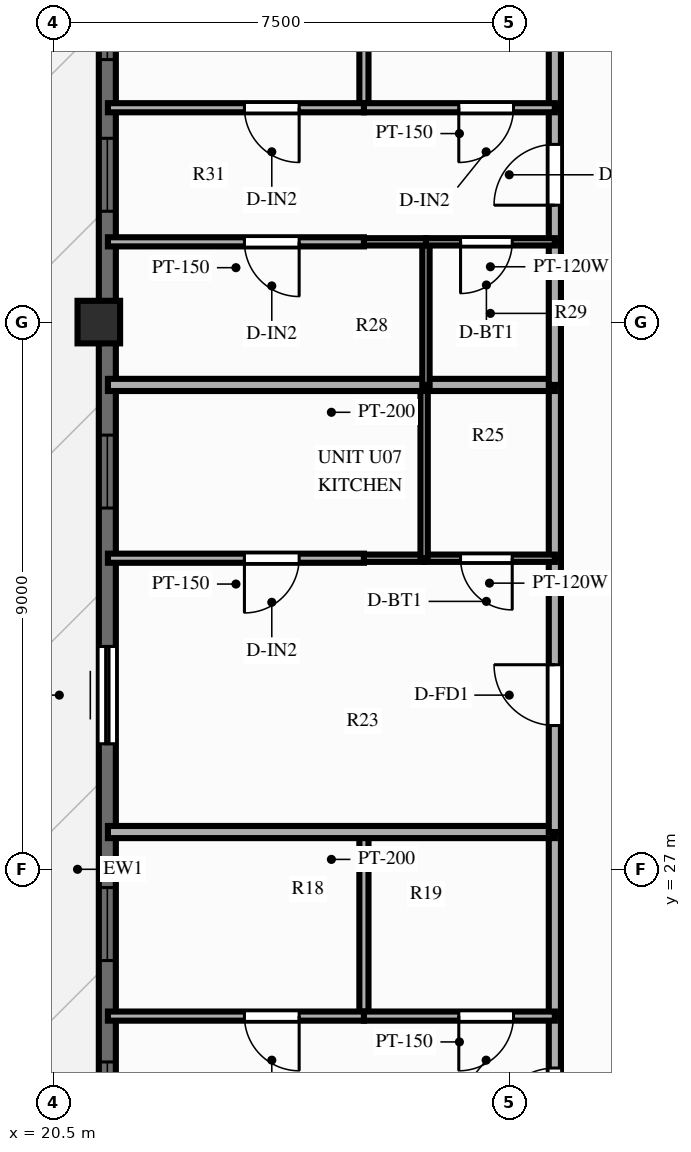
"""IFC4 building model, lengths in metres.
Left out: names, types, materials, properties, quantities, classifications, styles, units other than length and angle.
Written with IfcOpenShell. Run it as: python <this file> out.ifc"""

import sys

from ifc_helpers import new_model, si_unit, direction, frame, frame_2d, origin, origin_2d, place, context, subcontext, project, spatial, rectangle, extrude, source, transform, mapped, element, fill, save


model = new_model("IFC4")
c1 = context("Model", 3, precision=1e-05, world=origin(), true_north=direction((0.0, 1.0)))
c2 = subcontext(c1, "Body", "Model", "MODEL_VIEW")
j1 = project(units=[si_unit("LENGTHUNIT", "METRE"), si_unit("PLANEANGLEUNIT", "RADIAN")], contexts=[c1])
p1 = place(None, origin())
s1 = spatial("IfcSite", under=j1, at=p1, CompositionType="ELEMENT")
p2 = place(p1, origin())
s2 = spatial("IfcBuilding", under=s1, at=p2, CompositionType="ELEMENT")
p3 = place(p2, frame((0.0, 0.0, 236.1)))
s3 = spatial("IfcBuildingStorey", under=s2, at=p3, CompositionType="ELEMENT", Elevation=236.1)
m1 = source(origin(), c2, "Body", "SweptSolid", [
    extrude(rectangle(XDim=0.7, YDim=0.7, at=origin_2d()), origin(), (0.0, 0.0, 1.0), 3.9),
])
p4 = place(p3, frame((21.25, 36.0, 0.0), z_axis=(0.0, 0.0, 1.0), x_axis=(1.0, 0.0, 0.0)))
e1 = element("IfcColumn", 1, at=p4, inside=s3, PredefinedType="COLUMN", context=c2, shape_type="MappedRepresentation", body=[
    mapped(m1, transform((0.0, 0.0, 0.0), scale=1.0)),
])
p5 = place(p3, frame((21.39, 11.5, 0.0), z_axis=(0.0, 0.0, 1.0), x_axis=(0.0, 1.0, 0.0)))
e2 = element("IfcWall", 2, at=p5, inside=s3, PredefinedType="SOLIDWALL", context=c2, shape_type="SweptSolid", body=[
    extrude(rectangle(XDim=31.0, YDim=0.28, at=frame_2d((15.5, 0.0))), origin(), (0.0, 0.0, 1.0), 2.44),
])
p6 = place(p5, frame((0.7, 0.0, 0.25)))
e3 = element("IfcOpeningElement", 3, at=p6, cuts=e2, PredefinedType="OPENING", context=c2, shape_type="SweptSolid", body=[
    extrude(rectangle(XDim=1.2, YDim=1.5, at=frame_2d((0.6, 0.75))), frame((0.0, 0.152, 0.0), z_axis=(0.0, -1.0, 0.0), x_axis=(1.0, 0.0, 0.0)), (0.0, 0.0, 1.0), 0.304),
])
p7 = place(p5, frame((3.195, 0.0, 0.25)))
e4 = element("IfcOpeningElement", 4, at=p7, cuts=e2, PredefinedType="OPENING", context=c2, shape_type="SweptSolid", body=[
    extrude(rectangle(XDim=1.2, YDim=1.5, at=frame_2d((0.6, 0.75))), frame((0.0, 0.152, 0.0), z_axis=(0.0, -1.0, 0.0), x_axis=(1.0, 0.0, 0.0)), (0.0, 0.0, 1.0), 0.304),
])
p8 = place(p5, frame((7.068, 0.0, 0.25)))
e5 = element("IfcOpeningElement", 5, at=p8, cuts=e2, PredefinedType="OPENING", context=c2, shape_type="SweptSolid", body=[
    extrude(rectangle(XDim=0.7, YDim=1.5, at=frame_2d((0.35, 0.75))), frame((0.0, 0.152, 0.0), z_axis=(0.0, -1.0, 0.0), x_axis=(1.0, 0.0, 0.0)), (0.0, 0.0, 1.0), 0.304),
])
p9 = place(p5, frame((8.662, 0.0, 0.25)))
e6 = element("IfcOpeningElement", 6, at=p9, cuts=e2, PredefinedType="OPENING", context=c2, shape_type="SweptSolid", body=[
    extrude(rectangle(XDim=1.2, YDim=1.5, at=frame_2d((0.6, 0.75))), frame((0.0, 0.152, 0.0), z_axis=(0.0, -1.0, 0.0), x_axis=(1.0, 0.0, 0.0)), (0.0, 0.0, 1.0), 0.304),
])
p10 = place(p5, frame((11.131, 0.0, 0.25)))
e7 = element("IfcOpeningElement", 7, at=p10, cuts=e2, PredefinedType="OPENING", context=c2, shape_type="SweptSolid", body=[
    extrude(rectangle(XDim=1.2, YDim=1.5, at=frame_2d((0.6, 0.75))), frame((0.0, 0.152, 0.0), z_axis=(0.0, -1.0, 0.0), x_axis=(1.0, 0.0, 0.0)), (0.0, 0.0, 1.0), 0.304),
])
p11 = place(p5, frame((13.999, 0.0, 0.25)))
e8 = element("IfcOpeningElement", 8, at=p11, cuts=e2, PredefinedType="OPENING", context=c2, shape_type="SweptSolid", body=[
    extrude(rectangle(XDim=1.2, YDim=1.5, at=frame_2d((0.6, 0.75))), frame((0.0, 0.152, 0.0), z_axis=(0.0, -1.0, 0.0), x_axis=(1.0, 0.0, 0.0)), (0.0, 0.0, 1.0), 0.304),
])
p12 = place(p5, frame((17.565, 0.0, 0.0)))
e9 = element("IfcOpeningElement", 9, at=p12, cuts=e2, PredefinedType="OPENING", context=c2, shape_type="SweptSolid", body=[
    extrude(rectangle(XDim=1.6, YDim=2.15, at=frame_2d((0.8, 1.075))), frame((0.0, 0.152, 0.0), z_axis=(0.0, -1.0, 0.0), x_axis=(1.0, 0.0, 0.0)), (0.0, 0.0, 1.0), 0.304),
])
p13 = place(p5, frame((21.441, 0.0, 0.25)))
e10 = element("IfcOpeningElement", 10, at=p13, cuts=e2, PredefinedType="OPENING", context=c2, shape_type="SweptSolid", body=[
    extrude(rectangle(XDim=1.2, YDim=1.5, at=frame_2d((0.6, 0.75))), frame((0.0, 0.152, 0.0), z_axis=(0.0, -1.0, 0.0), x_axis=(1.0, 0.0, 0.0)), (0.0, 0.0, 1.0), 0.304),
])
p14 = place(p5, frame((26.323, 0.0, 0.25)))
e11 = element("IfcOpeningElement", 11, at=p14, cuts=e2, PredefinedType="OPENING", context=c2, shape_type="SweptSolid", body=[
    extrude(rectangle(XDim=1.2, YDim=1.5, at=frame_2d((0.6, 0.75))), frame((0.0, 0.152, 0.0), z_axis=(0.0, -1.0, 0.0), x_axis=(1.0, 0.0, 0.0)), (0.0, 0.0, 1.0), 0.304),
])
p15 = place(p5, frame((28.818, 0.0, 0.25)))
e12 = element("IfcOpeningElement", 12, at=p15, cuts=e2, PredefinedType="OPENING", context=c2, shape_type="SweptSolid", body=[
    extrude(rectangle(XDim=1.2, YDim=1.5, at=frame_2d((0.6, 0.75))), frame((0.0, 0.152, 0.0), z_axis=(0.0, -1.0, 0.0), x_axis=(1.0, 0.0, 0.0)), (0.0, 0.0, 1.0), 0.304),
])
p16 = place(p3, frame((28.75, 21.877, 0.0), z_axis=(0.0, 0.0, 1.0), x_axis=(0.0, 1.0, 0.0)))
e13 = element("IfcWall", 13, at=p16, inside=s3, PredefinedType="PARTITIONING", context=c2, shape_type="SweptSolid", body=[
    extrude(rectangle(XDim=2.709, YDim=0.2, at=frame_2d((1.354, 0.0))), origin(), (0.0, 0.0, 1.0), 3.56),
])
p17 = place(p16, frame((0.854, 0.0, 0.0)))
e14 = element("IfcOpeningElement", 14, at=p17, cuts=e13, PredefinedType="OPENING", context=c2, shape_type="SweptSolid", body=[
    extrude(rectangle(XDim=1.0, YDim=2.15, at=frame_2d((0.5, 1.075))), frame((0.0, 0.112, 0.0), z_axis=(0.0, -1.0, 0.0), x_axis=(1.0, 0.0, 0.0)), (0.0, 0.0, 1.0), 0.224),
])
p18 = place(p3, frame((28.75, 24.586, 0.0), z_axis=(0.0, 0.0, 1.0), x_axis=(0.0, 1.0, 0.0)))
e15 = element("IfcWall", 15, at=p18, inside=s3, PredefinedType="PARTITIONING", context=c2, shape_type="SweptSolid", body=[
    extrude(rectangle(XDim=3.027, YDim=0.2, at=frame_2d((1.514, 0.0))), origin(), (0.0, 0.0, 1.0), 3.56),
])
p19 = place(p3, frame((25.61, 24.586, 0.0), z_axis=(0.0, 0.0, 1.0), x_axis=(0.0, 1.0, 0.0)))
e16 = element("IfcWall", 16, at=p19, inside=s3, PredefinedType="PARTITIONING", context=c2, shape_type="SweptSolid", body=[
    extrude(rectangle(XDim=3.027, YDim=0.15, at=frame_2d((1.514, 0.0))), origin(), (0.0, 0.0, 1.0), 3.39),
])
p20 = place(p3, frame((28.75, 24.586, 0.0), z_axis=(0.0, 0.0, 1.0), x_axis=(-1.0, 0.0, 0.0)))
e17 = element("IfcWall", 17, at=p20, inside=s3, PredefinedType="PARTITIONING", context=c2, shape_type="SweptSolid", body=[
    extrude(rectangle(XDim=3.14, YDim=0.15, at=frame_2d((1.57, 0.0))), origin(), (0.0, 0.0, 1.0), 3.56),
])
p21 = place(p20, frame((0.68, 0.0, 0.0)))
e18 = element("IfcOpeningElement", 18, at=p21, cuts=e17, PredefinedType="OPENING", context=c2, shape_type="SweptSolid", body=[
    extrude(rectangle(XDim=0.9, YDim=2.1, at=frame_2d((0.45, 1.05))), frame((0.0, 0.087, 0.0), z_axis=(0.0, -1.0, 0.0), x_axis=(1.0, 0.0, 0.0)), (0.0, 0.0, 1.0), 0.174),
])
p22 = place(p3, frame((25.61, 24.586, 0.0), z_axis=(0.0, 0.0, 1.0), x_axis=(-1.0, 0.0, 0.0)))
e19 = element("IfcWall", 19, at=p22, inside=s3, PredefinedType="PARTITIONING", context=c2, shape_type="SweptSolid", body=[
    extrude(rectangle(XDim=4.21, YDim=0.15, at=frame_2d((2.105, 0.0))), origin(), (0.0, 0.0, 1.0), 3.56),
])
p23 = place(p22, frame((1.065, 0.0, 0.0)))
e20 = element("IfcOpeningElement", 20, at=p23, cuts=e19, PredefinedType="OPENING", context=c2, shape_type="SweptSolid", body=[
    extrude(rectangle(XDim=0.9, YDim=2.1, at=frame_2d((0.45, 1.05))), frame((0.0, 0.087, 0.0), z_axis=(0.0, -1.0, 0.0), x_axis=(1.0, 0.0, 0.0)), (0.0, 0.0, 1.0), 0.174),
])
p24 = place(p3, frame((28.75, 27.613, 0.0), z_axis=(0.0, 0.0, 1.0), x_axis=(-1.0, 0.0, 0.0)))
e21 = element("IfcWall", 21, at=p24, inside=s3, PredefinedType="PARTITIONING", context=c2, shape_type="SweptSolid", body=[
    extrude(rectangle(XDim=7.35, YDim=0.2, at=frame_2d((3.675, 0.0))), origin(), (0.0, 0.0, 1.0), 3.56),
])
p25 = place(p3, frame((28.75, 27.613, 0.0), z_axis=(0.0, 0.0, 1.0), x_axis=(0.0, 1.0, 0.0)))
e22 = element("IfcWall", 22, at=p25, inside=s3, PredefinedType="PARTITIONING", context=c2, shape_type="SweptSolid", body=[
    extrude(rectangle(XDim=4.504, YDim=0.2, at=frame_2d((2.252, 0.0))), origin(), (0.0, 0.0, 1.0), 3.56),
])
p26 = place(p25, frame((1.752, 0.0, 0.0)))
e23 = element("IfcOpeningElement", 23, at=p26, cuts=e22, PredefinedType="OPENING", context=c2, shape_type="SweptSolid", body=[
    extrude(rectangle(XDim=1.0, YDim=2.15, at=frame_2d((0.5, 1.075))), frame((0.0, 0.112, 0.0), z_axis=(0.0, -1.0, 0.0), x_axis=(1.0, 0.0, 0.0)), (0.0, 0.0, 1.0), 0.224),
])
p27 = place(p3, frame((28.75, 32.116, 0.0), z_axis=(0.0, 0.0, 1.0), x_axis=(0.0, 1.0, 0.0)))
e24 = element("IfcWall", 24, at=p27, inside=s3, PredefinedType="PARTITIONING", context=c2, shape_type="SweptSolid", body=[
    extrude(rectangle(XDim=2.85, YDim=0.2, at=frame_2d((1.425, 0.0))), origin(), (0.0, 0.0, 1.0), 3.56),
])
p28 = place(p3, frame((28.75, 32.116, 0.0), z_axis=(0.0, 0.0, 1.0), x_axis=(-1.0, 0.0, 0.0)))
e25 = element("IfcWall", 25, at=p28, inside=s3, PredefinedType="PARTITIONING", context=c2, shape_type="SweptSolid", body=[
    extrude(rectangle(XDim=2.15, YDim=0.12, at=frame_2d((1.075, 0.0))), origin(), (0.0, 0.0, 1.0), 3.29),
])
p29 = place(p28, frame((0.701, 0.0, 0.0)))
e26 = element("IfcOpeningElement", 26, at=p29, cuts=e25, PredefinedType="OPENING", context=c2, shape_type="SweptSolid", body=[
    extrude(rectangle(XDim=0.85, YDim=2.05, at=frame_2d((0.425, 1.025))), frame((0.0, 0.072, 0.0), z_axis=(0.0, -1.0, 0.0), x_axis=(1.0, 0.0, 0.0)), (0.0, 0.0, 1.0), 0.144),
])
p30 = place(p3, frame((26.6, 32.116, 0.0), z_axis=(0.0, 0.0, 1.0), x_axis=(-1.0, 0.0, 0.0)))
e27 = element("IfcWall", 27, at=p30, inside=s3, PredefinedType="PARTITIONING", context=c2, shape_type="SweptSolid", body=[
    extrude(rectangle(XDim=0.99, YDim=0.12, at=frame_2d((0.495, 0.0))), origin(), (0.0, 0.0, 1.0), 3.29),
])
p31 = place(p3, frame((26.6, 32.116, 0.0), z_axis=(0.0, 0.0, 1.0), x_axis=(0.0, 1.0, 0.0)))
e28 = element("IfcWall", 28, at=p31, inside=s3, PredefinedType="PARTITIONING", context=c2, shape_type="SweptSolid", body=[
    extrude(rectangle(XDim=2.85, YDim=0.12, at=frame_2d((1.425, 0.0))), origin(), (0.0, 0.0, 1.0), 3.39),
])
p32 = place(p3, frame((25.61, 32.116, 0.0), z_axis=(0.0, 0.0, 1.0), x_axis=(-1.0, 0.0, 0.0)))
e29 = element("IfcWall", 29, at=p32, inside=s3, PredefinedType="PARTITIONING", context=c2, shape_type="SweptSolid", body=[
    extrude(rectangle(XDim=4.21, YDim=0.15, at=frame_2d((2.105, 0.0))), origin(), (0.0, 0.0, 1.0), 3.29),
])
p33 = place(p32, frame((1.065, 0.0, 0.0)))
e30 = element("IfcOpeningElement", 30, at=p33, cuts=e29, PredefinedType="OPENING", context=c2, shape_type="SweptSolid", body=[
    extrude(rectangle(XDim=0.9, YDim=2.1, at=frame_2d((0.45, 1.05))), frame((0.0, 0.087, 0.0), z_axis=(0.0, -1.0, 0.0), x_axis=(1.0, 0.0, 0.0)), (0.0, 0.0, 1.0), 0.174),
])
p34 = place(p3, frame((28.75, 34.966, 0.0), z_axis=(0.0, 0.0, 1.0), x_axis=(-1.0, 0.0, 0.0)))
e31 = element("IfcWall", 31, at=p34, inside=s3, PredefinedType="PARTITIONING", context=c2, shape_type="SweptSolid", body=[
    extrude(rectangle(XDim=7.35, YDim=0.2, at=frame_2d((3.675, 0.0))), origin(), (0.0, 0.0, 1.0), 3.56),
])
p35 = place(p3, frame((28.75, 34.966, 0.0), z_axis=(0.0, 0.0, 1.0), x_axis=(0.0, 1.0, 0.0)))
e32 = element("IfcWall", 32, at=p35, inside=s3, PredefinedType="PARTITIONING", context=c2, shape_type="SweptSolid", body=[
    extrude(rectangle(XDim=2.354, YDim=0.2, at=frame_2d((1.177, 0.0))), origin(), (0.0, 0.0, 1.0), 2.24),
])
p36 = place(p3, frame((28.75, 37.32, 0.0), z_axis=(0.0, 0.0, 1.0), x_axis=(0.0, 1.0, 0.0)))
e33 = element("IfcWall", 33, at=p36, inside=s3, PredefinedType="PARTITIONING", context=c2, shape_type="SweptSolid", body=[
    extrude(rectangle(XDim=2.206, YDim=0.2, at=frame_2d((1.103, 0.0))), origin(), (0.0, 0.0, 1.0), 2.24),
])
p37 = place(p36, frame((0.603, 0.0, 0.0)))
e34 = element("IfcOpeningElement", 34, at=p37, cuts=e33, PredefinedType="OPENING", context=c2, shape_type="SweptSolid", body=[
    extrude(rectangle(XDim=1.0, YDim=2.15, at=frame_2d((0.5, 1.075))), frame((0.0, 0.112, 0.0), z_axis=(0.0, -1.0, 0.0), x_axis=(1.0, 0.0, 0.0)), (0.0, 0.0, 1.0), 0.224),
])
p38 = place(p3, frame((28.75, 39.526, 0.0), z_axis=(0.0, 0.0, 1.0), x_axis=(0.0, 1.0, 0.0)))
e35 = element("IfcWall", 35, at=p38, inside=s3, PredefinedType="PARTITIONING", context=c2, shape_type="SweptSolid", body=[
    extrude(rectangle(XDim=2.794, YDim=0.2, at=frame_2d((1.397, 0.0))), origin(), (0.0, 0.0, 1.0), 2.24),
])
p39 = place(p3, frame((26.63, 34.966, 0.0), z_axis=(0.0, 0.0, 1.0), x_axis=(0.0, 1.0, 0.0)))
e36 = element("IfcWall", 36, at=p39, inside=s3, PredefinedType="PARTITIONING", context=c2, shape_type="SweptSolid", body=[
    extrude(rectangle(XDim=2.354, YDim=0.12, at=frame_2d((1.177, 0.0))), origin(), (0.0, 0.0, 1.0), 3.39),
])
p40 = place(p3, frame((25.61, 39.526, 0.0), z_axis=(0.0, 0.0, 1.0), x_axis=(0.0, 1.0, 0.0)))
e37 = element("IfcWall", 37, at=p40, inside=s3, PredefinedType="PARTITIONING", context=c2, shape_type="SweptSolid", body=[
    extrude(rectangle(XDim=2.794, YDim=0.15, at=frame_2d((1.397, 0.0))), origin(), (0.0, 0.0, 1.0), 3.56),
])
p41 = place(p3, frame((28.75, 37.32, 0.0), z_axis=(0.0, 0.0, 1.0), x_axis=(-1.0, 0.0, 0.0)))
e38 = element("IfcWall", 38, at=p41, inside=s3, PredefinedType="PARTITIONING", context=c2, shape_type="SweptSolid", body=[
    extrude(rectangle(XDim=2.12, YDim=0.12, at=frame_2d((1.06, 0.0))), origin(), (0.0, 0.0, 1.0), 3.56),
])
p42 = place(p41, frame((0.701, 0.0, 0.0)))
e39 = element("IfcOpeningElement", 39, at=p42, cuts=e38, PredefinedType="OPENING", context=c2, shape_type="SweptSolid", body=[
    extrude(rectangle(XDim=0.85, YDim=2.05, at=frame_2d((0.425, 1.025))), frame((0.0, 0.072, 0.0), z_axis=(0.0, -1.0, 0.0), x_axis=(1.0, 0.0, 0.0)), (0.0, 0.0, 1.0), 0.144),
])
p43 = place(p3, frame((26.63, 37.32, 0.0), z_axis=(0.0, 0.0, 1.0), x_axis=(-1.0, 0.0, 0.0)))
e40 = element("IfcWall", 40, at=p43, inside=s3, PredefinedType="PARTITIONING", context=c2, shape_type="SweptSolid", body=[
    extrude(rectangle(XDim=1.02, YDim=0.12, at=frame_2d((0.51, 0.0))), origin(), (0.0, 0.0, 1.0), 3.56),
])
p44 = place(p3, frame((25.61, 37.32, 0.0), z_axis=(0.0, 0.0, 1.0), x_axis=(-1.0, 0.0, 0.0)))
e41 = element("IfcWall", 41, at=p44, inside=s3, PredefinedType="PARTITIONING", context=c2, shape_type="SweptSolid", body=[
    extrude(rectangle(XDim=4.21, YDim=0.15, at=frame_2d((2.105, 0.0))), origin(), (0.0, 0.0, 1.0), 3.56),
])
p45 = place(p44, frame((1.065, 0.0, 0.0)))
e42 = element("IfcOpeningElement", 42, at=p45, cuts=e41, PredefinedType="OPENING", context=c2, shape_type="SweptSolid", body=[
    extrude(rectangle(XDim=0.9, YDim=2.1, at=frame_2d((0.45, 1.05))), frame((0.0, 0.087, 0.0), z_axis=(0.0, -1.0, 0.0), x_axis=(1.0, 0.0, 0.0)), (0.0, 0.0, 1.0), 0.174),
])
p46 = place(p3, frame((28.75, 39.526, 0.0), z_axis=(0.0, 0.0, 1.0), x_axis=(-1.0, 0.0, 0.0)))
e43 = element("IfcWall", 43, at=p46, inside=s3, PredefinedType="PARTITIONING", context=c2, shape_type="SweptSolid", body=[
    extrude(rectangle(XDim=3.14, YDim=0.15, at=frame_2d((1.57, 0.0))), origin(), (0.0, 0.0, 1.0), 3.56),
])
p47 = place(p46, frame((0.68, 0.0, 0.0)))
e44 = element("IfcOpeningElement", 44, at=p47, cuts=e43, PredefinedType="OPENING", context=c2, shape_type="SweptSolid", body=[
    extrude(rectangle(XDim=0.9, YDim=2.1, at=frame_2d((0.45, 1.05))), frame((0.0, 0.087, 0.0), z_axis=(0.0, -1.0, 0.0), x_axis=(1.0, 0.0, 0.0)), (0.0, 0.0, 1.0), 0.174),
])
p48 = place(p3, frame((25.61, 39.526, 0.0), z_axis=(0.0, 0.0, 1.0), x_axis=(-1.0, 0.0, 0.0)))
e45 = element("IfcWall", 45, at=p48, inside=s3, PredefinedType="PARTITIONING", context=c2, shape_type="SweptSolid", body=[
    extrude(rectangle(XDim=4.21, YDim=0.15, at=frame_2d((2.105, 0.0))), origin(), (0.0, 0.0, 1.0), 3.56),
])
p49 = place(p48, frame((1.065, 0.0, 0.0)))
e46 = element("IfcOpeningElement", 46, at=p49, cuts=e45, PredefinedType="OPENING", context=c2, shape_type="SweptSolid", body=[
    extrude(rectangle(XDim=0.9, YDim=2.1, at=frame_2d((0.45, 1.05))), frame((0.0, 0.087, 0.0), z_axis=(0.0, -1.0, 0.0), x_axis=(1.0, 0.0, 0.0)), (0.0, 0.0, 1.0), 0.174),
])
m2 = source(origin(), c2, "Body", "SweptSolid", [
    extrude(rectangle(XDim=1.2, YDim=1.5, at=frame_2d((0.6, 0.75))), frame((0.0, 0.03, 0.0), z_axis=(0.0, -1.0, 0.0), x_axis=(1.0, 0.0, 0.0)), (0.0, 0.0, 1.0), 0.06),
])
p50 = place(p10, origin())
e47 = element("IfcWindow", 47, at=p50, inside=s3, PartitioningType="SINGLE_PANEL", PredefinedType="WINDOW", context=c2, shape_type="MappedRepresentation", body=[
    mapped(m2, transform((0.0, 0.0, 0.0), scale=1.0)),
])
fill(e7, e47)
p51 = place(p11, origin())
e48 = element("IfcWindow", 48, at=p51, inside=s3, PartitioningType="SINGLE_PANEL", PredefinedType="WINDOW", context=c2, shape_type="MappedRepresentation", body=[
    mapped(m2, transform((0.0, 0.0, 0.0), scale=1.0)),
])
fill(e8, e48)
m3 = source(origin(), c2, "Body", "SweptSolid", [
    extrude(rectangle(XDim=1.6, YDim=2.15, at=frame_2d((0.8, 1.075))), frame((0.0, 0.025, 0.0), z_axis=(0.0, -1.0, 0.0), x_axis=(1.0, 0.0, 0.0)), (0.0, 0.0, 1.0), 0.05),
])
p52 = place(p12, origin())
e49 = element("IfcDoor", 49, at=p52, inside=s3, OperationType="SLIDING_TO_LEFT", PredefinedType="DOOR", context=c2, shape_type="MappedRepresentation", body=[
    mapped(m3, transform((0.0, 0.0, 0.0), scale=1.0)),
])
fill(e9, e49)
p53 = place(p13, origin())
e50 = element("IfcWindow", 50, at=p53, inside=s3, PartitioningType="SINGLE_PANEL", PredefinedType="WINDOW", context=c2, shape_type="MappedRepresentation", body=[
    mapped(m2, transform((0.0, 0.0, 0.0), scale=1.0)),
])
fill(e10, e50)
p54 = place(p14, origin())
e51 = element("IfcWindow", 51, at=p54, inside=s3, PartitioningType="SINGLE_PANEL", PredefinedType="WINDOW", context=c2, shape_type="MappedRepresentation", body=[
    mapped(m2, transform((0.0, 0.0, 0.0), scale=1.0)),
])
fill(e11, e51)
p55 = place(p15, origin())
e52 = element("IfcWindow", 52, at=p55, inside=s3, PartitioningType="SINGLE_PANEL", PredefinedType="WINDOW", context=c2, shape_type="MappedRepresentation", body=[
    mapped(m2, transform((0.0, 0.0, 0.0), scale=1.0)),
])
fill(e12, e52)
m4 = source(origin(), c2, "Body", "SweptSolid", [
    extrude(rectangle(XDim=1.0, YDim=2.15, at=frame_2d((0.5, 1.075))), frame((0.0, 0.025, 0.0), z_axis=(0.0, -1.0, 0.0), x_axis=(1.0, 0.0, 0.0)), (0.0, 0.0, 1.0), 0.05),
])
p56 = place(p17, origin())
e53 = element("IfcDoor", 53, at=p56, inside=s3, OperationType="SINGLE_SWING_LEFT", PredefinedType="DOOR", context=c2, shape_type="MappedRepresentation", body=[
    mapped(m4, transform((0.0, 0.0, 0.0), scale=1.0)),
])
fill(e14, e53)
m5 = source(origin(), c2, "Body", "SweptSolid", [
    extrude(rectangle(XDim=0.9, YDim=2.1, at=frame_2d((0.45, 1.05))), frame((0.0, 0.025, 0.0), z_axis=(0.0, -1.0, 0.0), x_axis=(1.0, 0.0, 0.0)), (0.0, 0.0, 1.0), 0.05),
])
p57 = place(p21, origin())
e54 = element("IfcDoor", 54, at=p57, inside=s3, OperationType="SINGLE_SWING_RIGHT", PredefinedType="DOOR", context=c2, shape_type="MappedRepresentation", body=[
    mapped(m5, transform((0.0, 0.0, 0.0), scale=1.0)),
])
fill(e18, e54)
p58 = place(p23, origin())
e55 = element("IfcDoor", 55, at=p58, inside=s3, OperationType="SINGLE_SWING_LEFT", PredefinedType="DOOR", context=c2, shape_type="MappedRepresentation", body=[
    mapped(m5, transform((0.0, 0.0, 0.0), scale=1.0)),
])
fill(e20, e55)
p59 = place(p26, origin())
e56 = element("IfcDoor", 56, at=p59, inside=s3, OperationType="SINGLE_SWING_RIGHT", PredefinedType="DOOR", context=c2, shape_type="MappedRepresentation", body=[
    mapped(m4, transform((0.0, 0.0, 0.0), scale=1.0)),
])
fill(e23, e56)
m6 = source(origin(), c2, "Body", "SweptSolid", [
    extrude(rectangle(XDim=0.85, YDim=2.05, at=frame_2d((0.425, 1.025))), frame((0.0, 0.025, 0.0), z_axis=(0.0, -1.0, 0.0), x_axis=(1.0, 0.0, 0.0)), (0.0, 0.0, 1.0), 0.05),
])
p60 = place(p29, origin())
e57 = element("IfcDoor", 57, at=p60, inside=s3, OperationType="SINGLE_SWING_LEFT", PredefinedType="DOOR", context=c2, shape_type="MappedRepresentation", body=[
    mapped(m6, transform((0.0, 0.0, 0.0), scale=1.0)),
])
fill(e26, e57)
p61 = place(p33, origin())
e58 = element("IfcDoor", 58, at=p61, inside=s3, OperationType="SINGLE_SWING_RIGHT", PredefinedType="DOOR", context=c2, shape_type="MappedRepresentation", body=[
    mapped(m5, transform((0.0, 0.0, 0.0), scale=1.0)),
])
fill(e30, e58)
p62 = place(p37, origin())
e59 = element("IfcDoor", 59, at=p62, inside=s3, OperationType="SINGLE_SWING_LEFT", PredefinedType="DOOR", context=c2, shape_type="MappedRepresentation", body=[
    mapped(m4, transform((0.0, 0.0, 0.0), scale=1.0)),
])
fill(e34, e59)
p63 = place(p42, origin())
e60 = element("IfcDoor", 60, at=p63, inside=s3, OperationType="SINGLE_SWING_RIGHT", PredefinedType="DOOR", context=c2, shape_type="MappedRepresentation", body=[
    mapped(m6, transform((0.0, 0.0, 0.0), scale=1.0)),
])
fill(e39, e60)
p64 = place(p45, origin())
e61 = element("IfcDoor", 61, at=p64, inside=s3, OperationType="SINGLE_SWING_LEFT", PredefinedType="DOOR", context=c2, shape_type="MappedRepresentation", body=[
    mapped(m5, transform((0.0, 0.0, 0.0), scale=1.0)),
])
fill(e42, e61)
p65 = place(p47, origin())
e62 = element("IfcDoor", 62, at=p65, inside=s3, OperationType="SINGLE_SWING_RIGHT", PredefinedType="DOOR", context=c2, shape_type="MappedRepresentation", body=[
    mapped(m5, transform((0.0, 0.0, 0.0), scale=1.0)),
])
fill(e44, e62)
p66 = place(p49, origin())
e63 = element("IfcDoor", 63, at=p66, inside=s3, OperationType="SINGLE_SWING_LEFT", PredefinedType="DOOR", context=c2, shape_type="MappedRepresentation", body=[
    mapped(m5, transform((0.0, 0.0, 0.0), scale=1.0)),
])
fill(e46, e63)
save(model, sys.argv[1])
